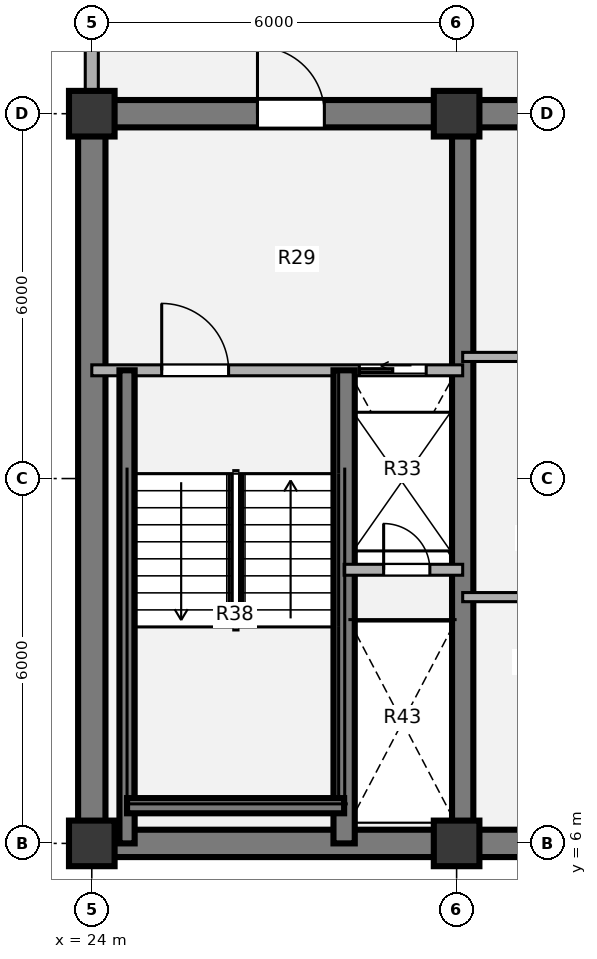
"""IFC4 building model, lengths in metres.
Left out: names, types, materials, properties, quantities, classifications, styles, units other than length and angle.
Written with IfcOpenShell. Run it as: python <this file> out.ifc"""

import sys

from ifc_helpers import new_model, si_unit, direction, frame, frame_2d, origin, origin_2d, place, context, subcontext, project, spatial, rectangle, extrude, source, transform, mapped, element, fill, save


model = new_model("IFC4")
c1 = context("Model", 3, precision=1e-05, world=origin(), true_north=direction((0.0, 1.0)))
c2 = subcontext(c1, "Body", "Model", "MODEL_VIEW")
j1 = project(units=[si_unit("LENGTHUNIT", "METRE"), si_unit("PLANEANGLEUNIT", "RADIAN")], contexts=[c1])
p1 = place(None, origin())
s1 = spatial("IfcSite", under=j1, at=p1, CompositionType="ELEMENT")
p2 = place(p1, origin())
s2 = spatial("IfcBuilding", under=s1, at=p2, CompositionType="ELEMENT")
p3 = place(p2, frame((0.0, 0.0, 160.2)))
s3 = spatial("IfcBuildingStorey", under=s2, at=p3, CompositionType="ELEMENT", Elevation=160.2)
m1 = source(origin(), c2, "Body", "SweptSolid", [
    extrude(rectangle(XDim=0.75, YDim=0.75, at=origin_2d()), origin(), (0.0, 0.0, 1.0), 3.78),
])
for number, where, z_axis, x_axis in (
    (1, (24.0, 6.0, 0.0), (0.0, 0.0, 1.0), (1.0, 0.0, 0.0)),
    (2, (30.0, 6.0, 0.0), (0.0, 0.0, 1.0), (1.0, 0.0, 0.0)),
    (3, (24.0, 18.0, 0.0), (0.0, 0.0, 1.0), (1.0, 0.0, 0.0)),
    (4, (30.0, 18.0, 0.0), (0.0, 0.0, 1.0), (1.0, 0.0, 0.0)),
):
    element("IfcColumn", number, at=place(p3, frame(where, z_axis=z_axis, x_axis=x_axis)), inside=s3, PredefinedType="COLUMN", context=c2, shape_type="MappedRepresentation", body=[
        mapped(m1, transform((0.0, 0.0, 0.0), x_axis=(1.0, 0.0, 0.0), y_axis=(0.0, 1.0, 0.0), z_axis=(0.0, 0.0, 1.0), scale=1.0)),
    ])
p4 = place(p3, frame((48.225, 6.0, 0.0), z_axis=(0.0, 0.0, 1.0), x_axis=(-1.0, 0.0, 0.0)))
e5 = element("IfcWall", 5, at=p4, inside=s3, PredefinedType="SHEAR", context=c2, shape_type="SweptSolid", body=[
    extrude(rectangle(XDim=24.45, YDim=0.45, at=frame_2d((12.225, 0.0))), origin(), (0.0, 0.0, 1.0), 3.78),
])
p5 = place(p3, frame((24.0, 6.0, 0.0), z_axis=(0.0, 0.0, 1.0), x_axis=(0.0, 1.0, 0.0)))
e6 = element("IfcWall", 6, at=p5, inside=s3, PredefinedType="SHEAR", context=c2, shape_type="SweptSolid", body=[
    extrude(rectangle(XDim=12.0, YDim=0.45, at=frame_2d((6.0, 0.0))), origin(), (0.0, 0.0, 1.0), 3.78),
])
p6 = place(p3, frame((23.775, 18.0, 0.0), z_axis=(0.0, 0.0, 1.0), x_axis=(1.0, 0.0, 0.0)))
e7 = element("IfcWall", 7, at=p6, inside=s3, PredefinedType="SHEAR", context=c2, shape_type="SweptSolid", body=[
    extrude(rectangle(XDim=9.425, YDim=0.45, at=frame_2d((4.712, 0.0))), origin(), (0.0, 0.0, 1.0), 3.78),
])
p7 = place(p6, frame((2.95, 0.0, 0.0)))
e8 = element("IfcOpeningElement", 8, at=p7, cuts=e7, PredefinedType="OPENING", context=c2, shape_type="SweptSolid", body=[
    extrude(rectangle(XDim=1.1, YDim=2.1, at=origin_2d()), frame((0.55, 0.235, 1.05), z_axis=(0.0, -1.0, 0.0), x_axis=(1.0, 0.0, 0.0)), (0.0, 0.0, 1.0), 0.47),
])
p8 = place(p3, frame((30.1, 6.0, 0.0), z_axis=(0.0, 0.0, 1.0), x_axis=(0.0, 1.0, 0.0)))
e9 = element("IfcWall", 9, at=p8, inside=s3, PredefinedType="SHEAR", context=c2, shape_type="SweptSolid", body=[
    extrude(rectangle(XDim=12.0, YDim=0.35, at=frame_2d((6.0, 0.0))), origin(), (0.0, 0.0, 1.0), 3.78),
])
p9 = place(p3, frame((24.0, 18.355, 0.0), z_axis=(0.0, 0.0, 1.0), x_axis=(0.0, 1.0, 0.0)))
e10 = element("IfcWall", 10, at=p9, inside=s3, PredefinedType="SOLIDWALL", context=c2, shape_type="SweptSolid", body=[
    extrude(rectangle(XDim=2.695, YDim=0.215, at=frame_2d((1.348, 0.0))), origin(), (0.0, 0.0, 1.0), 2.718),
])
for number, where, z_axis, x_axis in (
    (11, (30.1, 14.0, 0.0), (0.0, 0.0, 1.0), (1.0, 0.0, 0.0)),
    (12, (30.1, 10.05, 0.0), (0.0, 0.0, 1.0), (1.0, 0.0, 0.0)),
):
    element("IfcWall", number, at=place(p3, frame(where, z_axis=z_axis, x_axis=x_axis)), inside=s3, PredefinedType="PARTITIONING", context=c2, shape_type="SweptSolid", body=[
        extrude(rectangle(XDim=2.5, YDim=0.15, at=frame_2d((1.25, 0.0))), origin(), (0.0, 0.0, 1.0), 3.5),
    ])
p10 = place(p3, frame((24.0, 13.78, 0.0), z_axis=(0.0, 0.0, 1.0), x_axis=(1.0, 0.0, 0.0)))
e13 = element("IfcWall", 13, at=p10, inside=s3, PredefinedType="PARTITIONING", context=c2, shape_type="SweptSolid", body=[
    extrude(rectangle(XDim=6.1, YDim=0.18, at=frame_2d((3.05, 0.0))), origin(), (0.0, 0.0, 1.0), 3.5),
])
p11 = place(p10, frame((1.15, 0.0, 0.0)))
e14 = element("IfcOpeningElement", 14, at=p11, cuts=e13, PredefinedType="OPENING", context=c2, shape_type="SweptSolid", body=[
    extrude(rectangle(XDim=1.1, YDim=2.1, at=origin_2d()), frame((0.55, 0.1, 1.05), z_axis=(0.0, -1.0, 0.0), x_axis=(1.0, 0.0, 0.0)), (0.0, 0.0, 1.0), 0.2),
])
p12 = place(p10, frame((4.4, 0.0, 0.0)))
e15 = element("IfcOpeningElement", 15, at=p12, cuts=e13, PredefinedType="OPENING", context=c2, shape_type="SweptSolid", body=[
    extrude(rectangle(XDim=1.1, YDim=2.1, at=origin_2d()), frame((0.55, 0.1, 1.05), z_axis=(0.0, -1.0, 0.0), x_axis=(1.0, 0.0, 0.0)), (0.0, 0.0, 1.0), 0.2),
])
p13 = place(p3, frame((28.15, 6.0, 0.0), z_axis=(0.0, 0.0, 1.0), x_axis=(0.0, 1.0, 0.0)))
e16 = element("IfcWall", 16, at=p13, inside=s3, PredefinedType="SHEAR", context=c2, shape_type="SweptSolid", body=[
    extrude(rectangle(XDim=7.78, YDim=0.35, at=frame_2d((3.89, 0.0))), origin(), (0.0, 0.0, 1.0), 3.85),
])
p14 = place(p3, frame((24.58, 6.0, 0.0), z_axis=(0.0, 0.0, 1.0), x_axis=(0.0, 1.0, 0.0)))
e17 = element("IfcWall", 17, at=p14, inside=s3, PredefinedType="SHEAR", context=c2, shape_type="SweptSolid", body=[
    extrude(rectangle(XDim=7.78, YDim=0.25, at=frame_2d((3.89, 0.0))), origin(), (0.0, 0.0, 1.0), 3.85),
])
p15 = place(p3, frame((24.58, 6.62, 0.0), z_axis=(0.0, 0.0, 1.0), x_axis=(1.0, 0.0, 0.0)))
e18 = element("IfcWall", 18, at=p15, inside=s3, PredefinedType="SHEAR", context=c2, shape_type="SweptSolid", body=[
    extrude(rectangle(XDim=3.57, YDim=0.25, at=frame_2d((1.785, 0.0))), origin(), (0.0, 0.0, 1.0), 3.85),
])
p16 = place(p3, frame((28.15, 10.5, 0.0), z_axis=(0.0, 0.0, 1.0), x_axis=(1.0, 0.0, 0.0)))
e19 = element("IfcWall", 19, at=p16, inside=s3, PredefinedType="PARTITIONING", context=c2, shape_type="SweptSolid", body=[
    extrude(rectangle(XDim=1.95, YDim=0.18, at=frame_2d((0.975, 0.0))), origin(), (0.0, 0.0, 1.0), 3.5),
])
p17 = place(p16, frame((0.65, 0.0, 0.0)))
e20 = element("IfcOpeningElement", 20, at=p17, cuts=e19, PredefinedType="OPENING", context=c2, shape_type="SweptSolid", body=[
    extrude(rectangle(XDim=0.76, YDim=2.05, at=origin_2d()), frame((0.38, 0.1, 1.025), z_axis=(0.0, -1.0, 0.0), x_axis=(1.0, 0.0, 0.0)), (0.0, 0.0, 1.0), 0.2),
])
m2 = source(origin(), c2, "Body", "SweptSolid", [
    extrude(rectangle(XDim=1.1, YDim=2.1, at=origin_2d()), frame((0.55, 0.025, 1.05), z_axis=(0.0, -1.0, 0.0), x_axis=(1.0, 0.0, 0.0)), (0.0, 0.0, 1.0), 0.05),
])
p18 = place(p11, origin())
e21 = element("IfcDoor", 21, at=p18, inside=s3, OperationType="SINGLE_SWING_LEFT", PredefinedType="DOOR", context=c2, shape_type="MappedRepresentation", body=[
    mapped(m2, transform((0.0, 0.0, 0.0), x_axis=(1.0, 0.0, 0.0), y_axis=(0.0, 1.0, 0.0), z_axis=(0.0, 0.0, 1.0), scale=1.0)),
])
fill(e14, e21)
m3 = source(origin(), c2, "Body", "SweptSolid", [
    extrude(rectangle(XDim=1.1, YDim=2.1, at=origin_2d()), frame((0.55, 0.025, 1.05), z_axis=(0.0, -1.0, 0.0), x_axis=(1.0, 0.0, 0.0)), (0.0, 0.0, 1.0), 0.05),
])
p19 = place(p12, origin())
e22 = element("IfcDoor", 22, at=p19, inside=s3, OperationType="SLIDING_TO_LEFT", PredefinedType="DOOR", context=c2, shape_type="MappedRepresentation", body=[
    mapped(m3, transform((0.0, 0.0, 0.0), x_axis=(1.0, 0.0, 0.0), y_axis=(0.0, 1.0, 0.0), z_axis=(0.0, 0.0, 1.0), scale=1.0)),
])
fill(e15, e22)
m4 = source(origin(), c2, "Body", "SweptSolid", [
    extrude(rectangle(XDim=0.76, YDim=2.05, at=origin_2d()), frame((0.38, 0.025, 1.025), z_axis=(0.0, -1.0, 0.0), x_axis=(1.0, 0.0, 0.0)), (0.0, 0.0, 1.0), 0.05),
])
p20 = place(p17, origin())
e23 = element("IfcDoor", 23, at=p20, inside=s3, OperationType="SINGLE_SWING_LEFT", PredefinedType="DOOR", context=c2, shape_type="MappedRepresentation", body=[
    mapped(m4, transform((0.0, 0.0, 0.0), x_axis=(1.0, 0.0, 0.0), y_axis=(0.0, 1.0, 0.0), z_axis=(0.0, 0.0, 1.0), scale=1.0)),
])
fill(e20, e23)
m5 = source(origin(), c2, "Body", "SweptSolid", [
    extrude(rectangle(XDim=1.1, YDim=2.1, at=origin_2d()), frame((0.55, 0.025, 1.05), z_axis=(0.0, -1.0, 0.0), x_axis=(1.0, 0.0, 0.0)), (0.0, 0.0, 1.0), 0.05),
])
p21 = place(p7, origin())
e24 = element("IfcDoor", 24, at=p21, inside=s3, OperationType="SINGLE_SWING_LEFT", PredefinedType="DOOR", context=c2, shape_type="MappedRepresentation", body=[
    mapped(m5, transform((0.0, 0.0, 0.0), x_axis=(1.0, 0.0, 0.0), y_axis=(0.0, 1.0, 0.0), z_axis=(0.0, 0.0, 1.0), scale=1.0)),
])
fill(e8, e24)
save(model, sys.argv[1])
